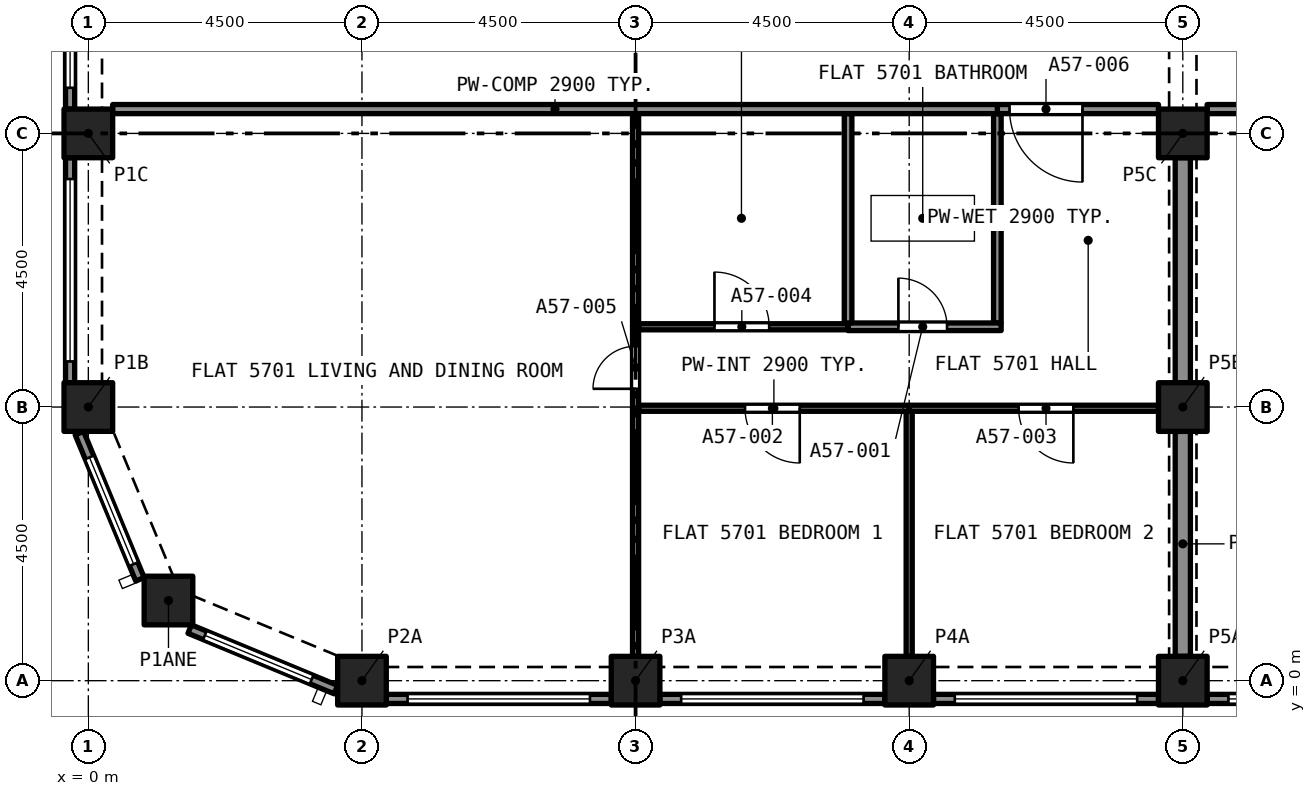
"""IFC4 building model, lengths in metres.
Left out: names, types, materials, properties, quantities, classifications, styles, units other than length and angle.
Written with IfcOpenShell. Run it as: python <this file> out.ifc"""

import sys

from ifc_helpers import new_model, si_unit, direction, frame, frame_2d, origin, origin_2d, place, context, subcontext, project, spatial, rectangle, extrude, element, fill, save


model = new_model("IFC4")
c1 = context("Model", 3, precision=1e-05, world=origin(), true_north=direction((0.0, 1.0)))
c2 = subcontext(c1, "Body", "Model", "MODEL_VIEW")
j1 = project(units=[si_unit("LENGTHUNIT", "METRE"), si_unit("PLANEANGLEUNIT", "RADIAN")], contexts=[c1])
p1 = place(None, origin())
s1 = spatial("IfcSite", under=j1, at=p1, CompositionType="ELEMENT")
p2 = place(p1, origin())
s2 = spatial("IfcBuilding", under=s1, at=p2, CompositionType="ELEMENT")
p3 = place(p2, frame((0.0, 0.0, 206.895)))
s3 = spatial("IfcBuildingStorey", under=s2, at=p3, CompositionType="ELEMENT", Elevation=206.895)
for number, where, z_axis, x_axis in (
    (1, (4.5, 0.0, 0.0), (0.0, 0.0, 1.0), (1.0, 0.0, 0.0)),
    (2, (9.0, 0.0, 0.0), (0.0, 0.0, 1.0), (1.0, 0.0, 0.0)),
    (3, (13.5, 0.0, 0.0), (0.0, 0.0, 1.0), (1.0, 0.0, 0.0)),
    (4, (18.0, 0.0, 0.0), (0.0, 0.0, 1.0), (1.0, 0.0, 0.0)),
    (5, (1.318, 1.318, 0.0), (0.0, 0.0, 1.0), (1.0, 0.0, 0.0)),
    (6, (0.0, 4.5, 0.0), (0.0, 0.0, 1.0), (1.0, 0.0, 0.0)),
    (7, (18.0, 4.5, 0.0), (0.0, 0.0, 1.0), (1.0, 0.0, 0.0)),
    (8, (0.0, 9.0, 0.0), (0.0, 0.0, 1.0), (1.0, 0.0, 0.0)),
    (9, (18.0, 9.0, 0.0), (0.0, 0.0, 1.0), (1.0, 0.0, 0.0)),
):
    element("IfcColumn", number, at=place(p3, frame(where, z_axis=z_axis, x_axis=x_axis)), inside=s3, PredefinedType="COLUMN", context=c2, shape_type="SweptSolid", body=[
        extrude(rectangle(XDim=0.8, YDim=0.8, at=origin_2d()), origin(), (0.0, 0.0, 1.0), 3.2),
    ])
p4 = place(p3, frame((-0.3, 9.4, 0.0), z_axis=(0.0, 0.0, 1.0), x_axis=(0.0, 1.0, 0.0)))
e10 = element("IfcWall", 10, at=p4, inside=s3, PredefinedType="SOLIDWALL", context=c2, shape_type="SweptSolid", body=[
    extrude(rectangle(XDim=3.7, YDim=0.15, at=frame_2d((1.85, 0.0))), origin(), (0.0, 0.0, 1.0), 3.2),
])
p5 = place(p4, frame((0.35, 0.0, 0.45)))
e11 = element("IfcOpeningElement", 11, at=p5, cuts=e10, PredefinedType="OPENING", context=c2, shape_type="SweptSolid", body=[
    extrude(rectangle(XDim=3.0, YDim=1.95, at=frame_2d((1.5, 0.975))), frame((0.0, 0.085, 0.0), z_axis=(0.0, -1.0, 0.0), x_axis=(1.0, 0.0, 0.0)), (0.0, 0.0, 1.0), 0.17),
])
p6 = place(p3, frame((-0.3, 4.9, 0.0), z_axis=(0.0, 0.0, 1.0), x_axis=(0.0, 1.0, 0.0)))
e12 = element("IfcWall", 12, at=p6, inside=s3, PredefinedType="SOLIDWALL", context=c2, shape_type="SweptSolid", body=[
    extrude(rectangle(XDim=3.7, YDim=0.15, at=frame_2d((1.85, 0.0))), origin(), (0.0, 0.0, 1.0), 3.2),
])
p7 = place(p6, frame((0.35, 0.0, 0.45)))
e13 = element("IfcOpeningElement", 13, at=p7, cuts=e12, PredefinedType="OPENING", context=c2, shape_type="SweptSolid", body=[
    extrude(rectangle(XDim=3.0, YDim=1.95, at=frame_2d((1.5, 0.975))), frame((0.0, 0.085, 0.0), z_axis=(0.0, -1.0, 0.0), x_axis=(1.0, 0.0, 0.0)), (0.0, 0.0, 1.0), 0.17),
])
p8 = place(p3, frame((0.849, 1.667, 0.0), z_axis=(0.0, 0.0, 1.0), x_axis=(-0.382669406082, 0.923885342263, 0.0)))
e14 = element("IfcWall", 14, at=p8, inside=s3, PredefinedType="SOLIDWALL", context=c2, shape_type="SweptSolid", body=[
    extrude(rectangle(XDim=2.602, YDim=0.15, at=frame_2d((1.301, 0.0))), origin(), (0.0, 0.0, 1.0), 3.2),
])
p9 = place(p8, frame((0.27, 0.0, 0.45)))
e15 = element("IfcOpeningElement", 15, at=p9, cuts=e14, PredefinedType="OPENING", context=c2, shape_type="SweptSolid", body=[
    extrude(rectangle(XDim=1.9, YDim=1.95, at=frame_2d((0.95, 0.975))), frame((0.0, 0.085, 0.0), z_axis=(0.0, -1.0, 0.0), x_axis=(1.0, 0.0, 0.0)), (0.0, 0.0, 1.0), 0.17),
])
p10 = place(p3, frame((4.071, -0.147, 0.0), z_axis=(0.0, 0.0, 1.0), x_axis=(-0.923885342263, 0.382669406082, 0.0)))
e16 = element("IfcWall", 16, at=p10, inside=s3, PredefinedType="SOLIDWALL", context=c2, shape_type="SweptSolid", body=[
    extrude(rectangle(XDim=2.602, YDim=0.15, at=frame_2d((1.301, 0.0))), origin(), (0.0, 0.0, 1.0), 3.2),
])
p11 = place(p10, frame((0.432, 0.0, 0.45)))
e17 = element("IfcOpeningElement", 17, at=p11, cuts=e16, PredefinedType="OPENING", context=c2, shape_type="SweptSolid", body=[
    extrude(rectangle(XDim=1.9, YDim=1.95, at=frame_2d((0.95, 0.975))), frame((0.0, 0.085, 0.0), z_axis=(0.0, -1.0, 0.0), x_axis=(1.0, 0.0, 0.0)), (0.0, 0.0, 1.0), 0.17),
])
p12 = place(p3, frame((8.6, -0.3, 0.0), z_axis=(0.0, 0.0, 1.0), x_axis=(-1.0, 0.0, 0.0)))
e18 = element("IfcWall", 18, at=p12, inside=s3, PredefinedType="SOLIDWALL", context=c2, shape_type="SweptSolid", body=[
    extrude(rectangle(XDim=3.7, YDim=0.15, at=frame_2d((1.85, 0.0))), origin(), (0.0, 0.0, 1.0), 3.2),
])
p13 = place(p12, frame((0.35, 0.0, 0.45)))
e19 = element("IfcOpeningElement", 19, at=p13, cuts=e18, PredefinedType="OPENING", context=c2, shape_type="SweptSolid", body=[
    extrude(rectangle(XDim=3.0, YDim=1.95, at=frame_2d((1.5, 0.975))), frame((0.0, 0.085, 0.0), z_axis=(0.0, -1.0, 0.0), x_axis=(1.0, 0.0, 0.0)), (0.0, 0.0, 1.0), 0.17),
])
p14 = place(p3, frame((13.1, -0.3, 0.0), z_axis=(0.0, 0.0, 1.0), x_axis=(-1.0, 0.0, 0.0)))
e20 = element("IfcWall", 20, at=p14, inside=s3, PredefinedType="SOLIDWALL", context=c2, shape_type="SweptSolid", body=[
    extrude(rectangle(XDim=3.7, YDim=0.15, at=frame_2d((1.85, 0.0))), origin(), (0.0, 0.0, 1.0), 3.2),
])
p15 = place(p14, frame((0.35, 0.0, 0.45)))
e21 = element("IfcOpeningElement", 21, at=p15, cuts=e20, PredefinedType="OPENING", context=c2, shape_type="SweptSolid", body=[
    extrude(rectangle(XDim=3.0, YDim=1.95, at=frame_2d((1.5, 0.975))), frame((0.0, 0.085, 0.0), z_axis=(0.0, -1.0, 0.0), x_axis=(1.0, 0.0, 0.0)), (0.0, 0.0, 1.0), 0.17),
])
p16 = place(p3, frame((17.6, -0.3, 0.0), z_axis=(0.0, 0.0, 1.0), x_axis=(-1.0, 0.0, 0.0)))
e22 = element("IfcWall", 22, at=p16, inside=s3, PredefinedType="SOLIDWALL", context=c2, shape_type="SweptSolid", body=[
    extrude(rectangle(XDim=3.7, YDim=0.15, at=frame_2d((1.85, 0.0))), origin(), (0.0, 0.0, 1.0), 3.2),
])
p17 = place(p16, frame((0.35, 0.0, 0.45)))
e23 = element("IfcOpeningElement", 23, at=p17, cuts=e22, PredefinedType="OPENING", context=c2, shape_type="SweptSolid", body=[
    extrude(rectangle(XDim=3.0, YDim=1.95, at=frame_2d((1.5, 0.975))), frame((0.0, 0.085, 0.0), z_axis=(0.0, -1.0, 0.0), x_axis=(1.0, 0.0, 0.0)), (0.0, 0.0, 1.0), 0.17),
])
p18 = place(p3, frame((22.1, -0.3, 0.0), z_axis=(0.0, 0.0, 1.0), x_axis=(-1.0, 0.0, 0.0)))
e24 = element("IfcWall", 24, at=p18, inside=s3, PredefinedType="SOLIDWALL", context=c2, shape_type="SweptSolid", body=[
    extrude(rectangle(XDim=3.7, YDim=0.15, at=frame_2d((1.85, 0.0))), origin(), (0.0, 0.0, 1.0), 3.2),
])
p19 = place(p18, frame((0.35, 0.0, 0.45)))
e25 = element("IfcOpeningElement", 25, at=p19, cuts=e24, PredefinedType="OPENING", context=c2, shape_type="SweptSolid", body=[
    extrude(rectangle(XDim=3.0, YDim=1.95, at=frame_2d((1.5, 0.975))), frame((0.0, 0.085, 0.0), z_axis=(0.0, -1.0, 0.0), x_axis=(1.0, 0.0, 0.0)), (0.0, 0.0, 1.0), 0.17),
])
p20 = place(p3, frame((14.95, 5.883, 0.0), z_axis=(0.0, 0.0, 1.0), x_axis=(0.0, 1.0, 0.0)))
e26 = element("IfcWall", 26, at=p20, inside=s3, PredefinedType="PARTITIONING", context=c2, shape_type="SweptSolid", body=[
    extrude(rectangle(XDim=3.442, YDim=0.125, at=frame_2d((1.721, 0.0))), origin(), (0.0, 0.0, 1.0), 2.9),
])
p21 = place(p3, frame((12.495, 5.82, 0.0), z_axis=(0.0, 0.0, 1.0), x_axis=(1.0, 0.0, 0.0)))
e27 = element("IfcWall", 27, at=p21, inside=s3, PredefinedType="PARTITIONING", context=c2, shape_type="SweptSolid", body=[
    extrude(rectangle(XDim=2.518, YDim=0.125, at=frame_2d((1.259, 0.0))), origin(), (0.0, 0.0, 1.0), 2.9),
])
p22 = place(p21, frame((0.828, 0.0, 0.0)))
e28 = element("IfcOpeningElement", 28, at=p22, cuts=e27, PredefinedType="OPENING", context=c2, shape_type="SweptSolid", body=[
    extrude(rectangle(XDim=0.8, YDim=2.1, at=frame_2d((0.4, 1.05))), frame((0.0, 0.073, 0.0), z_axis=(0.0, -1.0, 0.0), x_axis=(1.0, 0.0, 0.0)), (0.0, 0.0, 1.0), 0.145),
])
p23 = place(p3, frame((12.495, 5.883, 0.0), z_axis=(0.0, 0.0, 1.0), x_axis=(0.0, 1.0, 0.0)))
e29 = element("IfcWall", 29, at=p23, inside=s3, PredefinedType="PARTITIONING", context=c2, shape_type="SweptSolid", body=[
    extrude(rectangle(XDim=3.442, YDim=0.125, at=frame_2d((1.721, 0.0))), origin(), (0.0, 0.0, 1.0), 2.9),
])
p24 = place(p3, frame((13.5, 0.4, 0.0), z_axis=(0.0, 0.0, 1.0), x_axis=(0.0, 1.0, 0.0)))
e30 = element("IfcWall", 30, at=p24, inside=s3, PredefinedType="PARTITIONING", context=c2, shape_type="SweptSolid", body=[
    extrude(rectangle(XDim=4.03, YDim=0.1, at=frame_2d((2.015, 0.0))), origin(), (0.0, 0.0, 1.0), 2.9),
])
p25 = place(p3, frame((13.5, 4.48, 0.0), z_axis=(0.0, 0.0, 1.0), x_axis=(-1.0, 0.0, 0.0)))
e31 = element("IfcWall", 31, at=p25, inside=s3, PredefinedType="PARTITIONING", context=c2, shape_type="SweptSolid", body=[
    extrude(rectangle(XDim=4.45, YDim=0.1, at=frame_2d((2.225, 0.0))), origin(), (0.0, 0.0, 1.0), 2.9),
])
p26 = place(p25, frame((1.8, 0.0, 0.0)))
e32 = element("IfcOpeningElement", 32, at=p26, cuts=e31, PredefinedType="OPENING", context=c2, shape_type="SweptSolid", body=[
    extrude(rectangle(XDim=0.9, YDim=2.1, at=frame_2d((0.45, 1.05))), frame((0.0, 0.06, 0.0), z_axis=(0.0, -1.0, 0.0), x_axis=(1.0, 0.0, 0.0)), (0.0, 0.0, 1.0), 0.12),
])
p27 = place(p3, frame((9.0, 0.4, 0.0), z_axis=(0.0, 0.0, 1.0), x_axis=(0.0, 1.0, 0.0)))
e33 = element("IfcWall", 33, at=p27, inside=s3, PredefinedType="PARTITIONING", context=c2, shape_type="SweptSolid", body=[
    extrude(rectangle(XDim=4.08, YDim=0.1, at=frame_2d((2.04, 0.0))), origin(), (0.0, 0.0, 1.0), 2.9),
])
p28 = place(p3, frame((17.6, 4.48, 0.0), z_axis=(0.0, 0.0, 1.0), x_axis=(-1.0, 0.0, 0.0)))
e34 = element("IfcWall", 34, at=p28, inside=s3, PredefinedType="PARTITIONING", context=c2, shape_type="SweptSolid", body=[
    extrude(rectangle(XDim=4.1, YDim=0.1, at=frame_2d((2.05, 0.0))), origin(), (0.0, 0.0, 1.0), 2.9),
])
p29 = place(p28, frame((1.4, 0.0, 0.0)))
e35 = element("IfcOpeningElement", 35, at=p29, cuts=e34, PredefinedType="OPENING", context=c2, shape_type="SweptSolid", body=[
    extrude(rectangle(XDim=0.9, YDim=2.1, at=frame_2d((0.45, 1.05))), frame((0.0, 0.06, 0.0), z_axis=(0.0, -1.0, 0.0), x_axis=(1.0, 0.0, 0.0)), (0.0, 0.0, 1.0), 0.12),
])
p30 = place(p3, frame((18.0, 0.4, 0.0), z_axis=(0.0, 0.0, 1.0), x_axis=(0.0, 1.0, 0.0)))
e36 = element("IfcWall", 36, at=p30, inside=s3, PredefinedType="PARTITIONING", context=c2, shape_type="SweptSolid", body=[
    extrude(rectangle(XDim=3.7, YDim=0.25, at=frame_2d((1.85, 0.0))), origin(), (0.0, 0.0, 1.0), 2.38),
])
p31 = place(p3, frame((9.05, 5.82, 0.0), z_axis=(0.0, 0.0, 1.0), x_axis=(1.0, 0.0, 0.0)))
e37 = element("IfcWall", 37, at=p31, inside=s3, PredefinedType="PARTITIONING", context=c2, shape_type="SweptSolid", body=[
    extrude(rectangle(XDim=3.445, YDim=0.1, at=frame_2d((1.722, 0.0))), origin(), (0.0, 0.0, 1.0), 2.9),
])
p32 = place(p31, frame((1.247, 0.0, 0.0)))
e38 = element("IfcOpeningElement", 38, at=p32, cuts=e37, PredefinedType="OPENING", context=c2, shape_type="SweptSolid", body=[
    extrude(rectangle(XDim=0.9, YDim=2.1, at=frame_2d((0.45, 1.05))), frame((0.0, 0.06, 0.0), z_axis=(0.0, -1.0, 0.0), x_axis=(1.0, 0.0, 0.0)), (0.0, 0.0, 1.0), 0.12),
])
p33 = place(p3, frame((9.0, 4.48, 0.0), z_axis=(0.0, 0.0, 1.0), x_axis=(0.0, 1.0, 0.0)))
e39 = element("IfcWall", 39, at=p33, inside=s3, PredefinedType="PARTITIONING", context=c2, shape_type="SweptSolid", body=[
    extrude(rectangle(XDim=1.34, YDim=0.1, at=frame_2d((0.67, 0.0))), origin(), (0.0, 0.0, 1.0), 2.9),
])
p34 = place(p33, frame((0.32, 0.0, 0.0)))
e40 = element("IfcOpeningElement", 40, at=p34, cuts=e39, PredefinedType="OPENING", context=c2, shape_type="SweptSolid", body=[
    extrude(rectangle(XDim=0.7, YDim=2.1, at=frame_2d((0.35, 1.05))), frame((0.0, 0.06, 0.0), z_axis=(0.0, -1.0, 0.0), x_axis=(1.0, 0.0, 0.0)), (0.0, 0.0, 1.0), 0.12),
])
p35 = place(p3, frame((18.0, 4.9, 0.0), z_axis=(0.0, 0.0, 1.0), x_axis=(0.0, 1.0, 0.0)))
e41 = element("IfcWall", 41, at=p35, inside=s3, PredefinedType="PARTITIONING", context=c2, shape_type="SweptSolid", body=[
    extrude(rectangle(XDim=3.7, YDim=0.25, at=frame_2d((1.85, 0.0))), origin(), (0.0, 0.0, 1.0), 2.38),
])
p36 = place(p3, frame((17.6, 9.4, 0.0), z_axis=(0.0, 0.0, 1.0), x_axis=(-1.0, 0.0, 0.0)))
e42 = element("IfcWall", 42, at=p36, inside=s3, PredefinedType="PARTITIONING", context=c2, shape_type="SweptSolid", body=[
    extrude(rectangle(XDim=2.65, YDim=0.15, at=frame_2d((1.325, 0.0))), origin(), (0.0, 0.0, 1.0), 2.9),
])
p37 = place(p36, frame((1.25, 0.0, 0.0)))
e43 = element("IfcOpeningElement", 43, at=p37, cuts=e42, PredefinedType="OPENING", context=c2, shape_type="SweptSolid", body=[
    extrude(rectangle(XDim=1.2, YDim=2.4, at=frame_2d((0.6, 1.2))), frame((0.0, 0.085, 0.0), z_axis=(0.0, -1.0, 0.0), x_axis=(1.0, 0.0, 0.0)), (0.0, 0.0, 1.0), 0.17),
])
p38 = place(p3, frame((9.0, 5.82, 0.0), z_axis=(0.0, 0.0, 1.0), x_axis=(0.0, 1.0, 0.0)))
e44 = element("IfcWall", 44, at=p38, inside=s3, PredefinedType="PARTITIONING", context=c2, shape_type="SweptSolid", body=[
    extrude(rectangle(XDim=3.505, YDim=0.1, at=frame_2d((1.752, 0.0))), origin(), (0.0, 0.0, 1.0), 2.9),
])
p39 = place(p3, frame((0.4, 9.4, 0.0), z_axis=(0.0, 0.0, 1.0), x_axis=(1.0, 0.0, 0.0)))
e45 = element("IfcWall", 45, at=p39, inside=s3, PredefinedType="PARTITIONING", context=c2, shape_type="SweptSolid", body=[
    extrude(rectangle(XDim=14.55, YDim=0.15, at=frame_2d((7.275, 0.0))), origin(), (0.0, 0.0, 1.0), 2.9),
])
p40 = place(p3, frame((27.0, 9.4, 0.0), z_axis=(0.0, 0.0, 1.0), x_axis=(-1.0, 0.0, 0.0)))
e46 = element("IfcWall", 46, at=p40, inside=s3, PredefinedType="PARTITIONING", context=c2, shape_type="SweptSolid", body=[
    extrude(rectangle(XDim=8.6, YDim=0.15, at=frame_2d((4.3, 0.0))), origin(), (0.0, 0.0, 1.0), 2.75),
])
p41 = place(p40, frame((4.0, 0.0, 0.0)))
e47 = element("IfcOpeningElement", 47, at=p41, cuts=e46, PredefinedType="OPENING", context=c2, shape_type="SweptSolid", body=[
    extrude(rectangle(XDim=1.0, YDim=2.1, at=frame_2d((0.5, 1.05))), frame((0.0, 0.085, 0.0), z_axis=(0.0, -1.0, 0.0), x_axis=(1.0, 0.0, 0.0)), (0.0, 0.0, 1.0), 0.17),
])
p42 = place(p5, origin())
e48 = element("IfcWindow", 48, at=p42, inside=s3, PartitioningType="SINGLE_PANEL", PredefinedType="WINDOW", context=c2, shape_type="SweptSolid", body=[
    extrude(rectangle(XDim=3.0, YDim=1.95, at=frame_2d((1.5, 0.975))), frame((0.0, 0.03, 0.0), z_axis=(0.0, -1.0, 0.0), x_axis=(1.0, 0.0, 0.0)), (0.0, 0.0, 1.0), 0.06),
])
fill(e11, e48)
p43 = place(p7, origin())
e49 = element("IfcWindow", 49, at=p43, inside=s3, PartitioningType="SINGLE_PANEL", PredefinedType="WINDOW", context=c2, shape_type="SweptSolid", body=[
    extrude(rectangle(XDim=3.0, YDim=1.95, at=frame_2d((1.5, 0.975))), frame((0.0, 0.03, 0.0), z_axis=(0.0, -1.0, 0.0), x_axis=(1.0, 0.0, 0.0)), (0.0, 0.0, 1.0), 0.06),
])
fill(e13, e49)
p44 = place(p9, origin())
e50 = element("IfcWindow", 50, at=p44, inside=s3, PartitioningType="SINGLE_PANEL", PredefinedType="WINDOW", context=c2, shape_type="SweptSolid", body=[
    extrude(rectangle(XDim=1.9, YDim=1.95, at=frame_2d((0.95, 0.975))), frame((0.0, 0.03, 0.0), z_axis=(0.0, -1.0, 0.0), x_axis=(1.0, 0.0, 0.0)), (0.0, 0.0, 1.0), 0.06),
])
fill(e15, e50)
p45 = place(p11, origin())
e51 = element("IfcWindow", 51, at=p45, inside=s3, PartitioningType="SINGLE_PANEL", PredefinedType="WINDOW", context=c2, shape_type="SweptSolid", body=[
    extrude(rectangle(XDim=1.9, YDim=1.95, at=frame_2d((0.95, 0.975))), frame((0.0, 0.03, 0.0), z_axis=(0.0, -1.0, 0.0), x_axis=(1.0, 0.0, 0.0)), (0.0, 0.0, 1.0), 0.06),
])
fill(e17, e51)
p46 = place(p13, origin())
e52 = element("IfcWindow", 52, at=p46, inside=s3, PartitioningType="SINGLE_PANEL", PredefinedType="WINDOW", context=c2, shape_type="SweptSolid", body=[
    extrude(rectangle(XDim=3.0, YDim=1.95, at=frame_2d((1.5, 0.975))), frame((0.0, 0.03, 0.0), z_axis=(0.0, -1.0, 0.0), x_axis=(1.0, 0.0, 0.0)), (0.0, 0.0, 1.0), 0.06),
])
fill(e19, e52)
p47 = place(p15, origin())
e53 = element("IfcWindow", 53, at=p47, inside=s3, PartitioningType="SINGLE_PANEL", PredefinedType="WINDOW", context=c2, shape_type="SweptSolid", body=[
    extrude(rectangle(XDim=3.0, YDim=1.95, at=frame_2d((1.5, 0.975))), frame((0.0, 0.03, 0.0), z_axis=(0.0, -1.0, 0.0), x_axis=(1.0, 0.0, 0.0)), (0.0, 0.0, 1.0), 0.06),
])
fill(e21, e53)
p48 = place(p17, origin())
e54 = element("IfcWindow", 54, at=p48, inside=s3, PartitioningType="SINGLE_PANEL", PredefinedType="WINDOW", context=c2, shape_type="SweptSolid", body=[
    extrude(rectangle(XDim=3.0, YDim=1.95, at=frame_2d((1.5, 0.975))), frame((0.0, 0.03, 0.0), z_axis=(0.0, -1.0, 0.0), x_axis=(1.0, 0.0, 0.0)), (0.0, 0.0, 1.0), 0.06),
])
fill(e23, e54)
p49 = place(p19, origin())
e55 = element("IfcWindow", 55, at=p49, inside=s3, PartitioningType="SINGLE_PANEL", PredefinedType="WINDOW", context=c2, shape_type="SweptSolid", body=[
    extrude(rectangle(XDim=3.0, YDim=1.95, at=frame_2d((1.5, 0.975))), frame((0.0, 0.03, 0.0), z_axis=(0.0, -1.0, 0.0), x_axis=(1.0, 0.0, 0.0)), (0.0, 0.0, 1.0), 0.06),
])
fill(e25, e55)
p50 = place(p22, origin())
e56 = element("IfcDoor", 56, at=p50, inside=s3, OperationType="SINGLE_SWING_LEFT", PredefinedType="DOOR", context=c2, shape_type="SweptSolid", body=[
    extrude(rectangle(XDim=0.8, YDim=2.1, at=frame_2d((0.4, 1.05))), frame((0.0, 0.025, 0.0), z_axis=(0.0, -1.0, 0.0), x_axis=(1.0, 0.0, 0.0)), (0.0, 0.0, 1.0), 0.05),
])
fill(e28, e56)
p51 = place(p26, origin())
e57 = element("IfcDoor", 57, at=p51, inside=s3, OperationType="SINGLE_SWING_RIGHT", PredefinedType="DOOR", context=c2, shape_type="SweptSolid", body=[
    extrude(rectangle(XDim=0.9, YDim=2.1, at=frame_2d((0.45, 1.05))), frame((0.0, 0.025, 0.0), z_axis=(0.0, -1.0, 0.0), x_axis=(1.0, 0.0, 0.0)), (0.0, 0.0, 1.0), 0.05),
])
fill(e32, e57)
p52 = place(p29, origin())
e58 = element("IfcDoor", 58, at=p52, inside=s3, OperationType="SINGLE_SWING_LEFT", PredefinedType="DOOR", context=c2, shape_type="SweptSolid", body=[
    extrude(rectangle(XDim=0.9, YDim=2.1, at=frame_2d((0.45, 1.05))), frame((0.0, 0.025, 0.0), z_axis=(0.0, -1.0, 0.0), x_axis=(1.0, 0.0, 0.0)), (0.0, 0.0, 1.0), 0.05),
])
fill(e35, e58)
p53 = place(p32, origin())
e59 = element("IfcDoor", 59, at=p53, inside=s3, OperationType="SINGLE_SWING_LEFT", PredefinedType="DOOR", context=c2, shape_type="SweptSolid", body=[
    extrude(rectangle(XDim=0.9, YDim=2.1, at=frame_2d((0.45, 1.05))), frame((0.0, 0.025, 0.0), z_axis=(0.0, -1.0, 0.0), x_axis=(1.0, 0.0, 0.0)), (0.0, 0.0, 1.0), 0.05),
])
fill(e38, e59)
p54 = place(p34, origin())
e60 = element("IfcDoor", 60, at=p54, inside=s3, OperationType="SINGLE_SWING_LEFT", PredefinedType="DOOR", context=c2, shape_type="SweptSolid", body=[
    extrude(rectangle(XDim=0.7, YDim=2.1, at=frame_2d((0.35, 1.05))), frame((0.0, 0.025, 0.0), z_axis=(0.0, -1.0, 0.0), x_axis=(1.0, 0.0, 0.0)), (0.0, 0.0, 1.0), 0.05),
])
fill(e40, e60)
p55 = place(p37, origin())
e61 = element("IfcDoor", 61, at=p55, inside=s3, OperationType="SINGLE_SWING_RIGHT", PredefinedType="DOOR", context=c2, shape_type="SweptSolid", body=[
    extrude(rectangle(XDim=1.2, YDim=2.4, at=frame_2d((0.6, 1.2))), frame((0.0, 0.025, 0.0), z_axis=(0.0, -1.0, 0.0), x_axis=(1.0, 0.0, 0.0)), (0.0, 0.0, 1.0), 0.05),
])
fill(e43, e61)
save(model, sys.argv[1])
